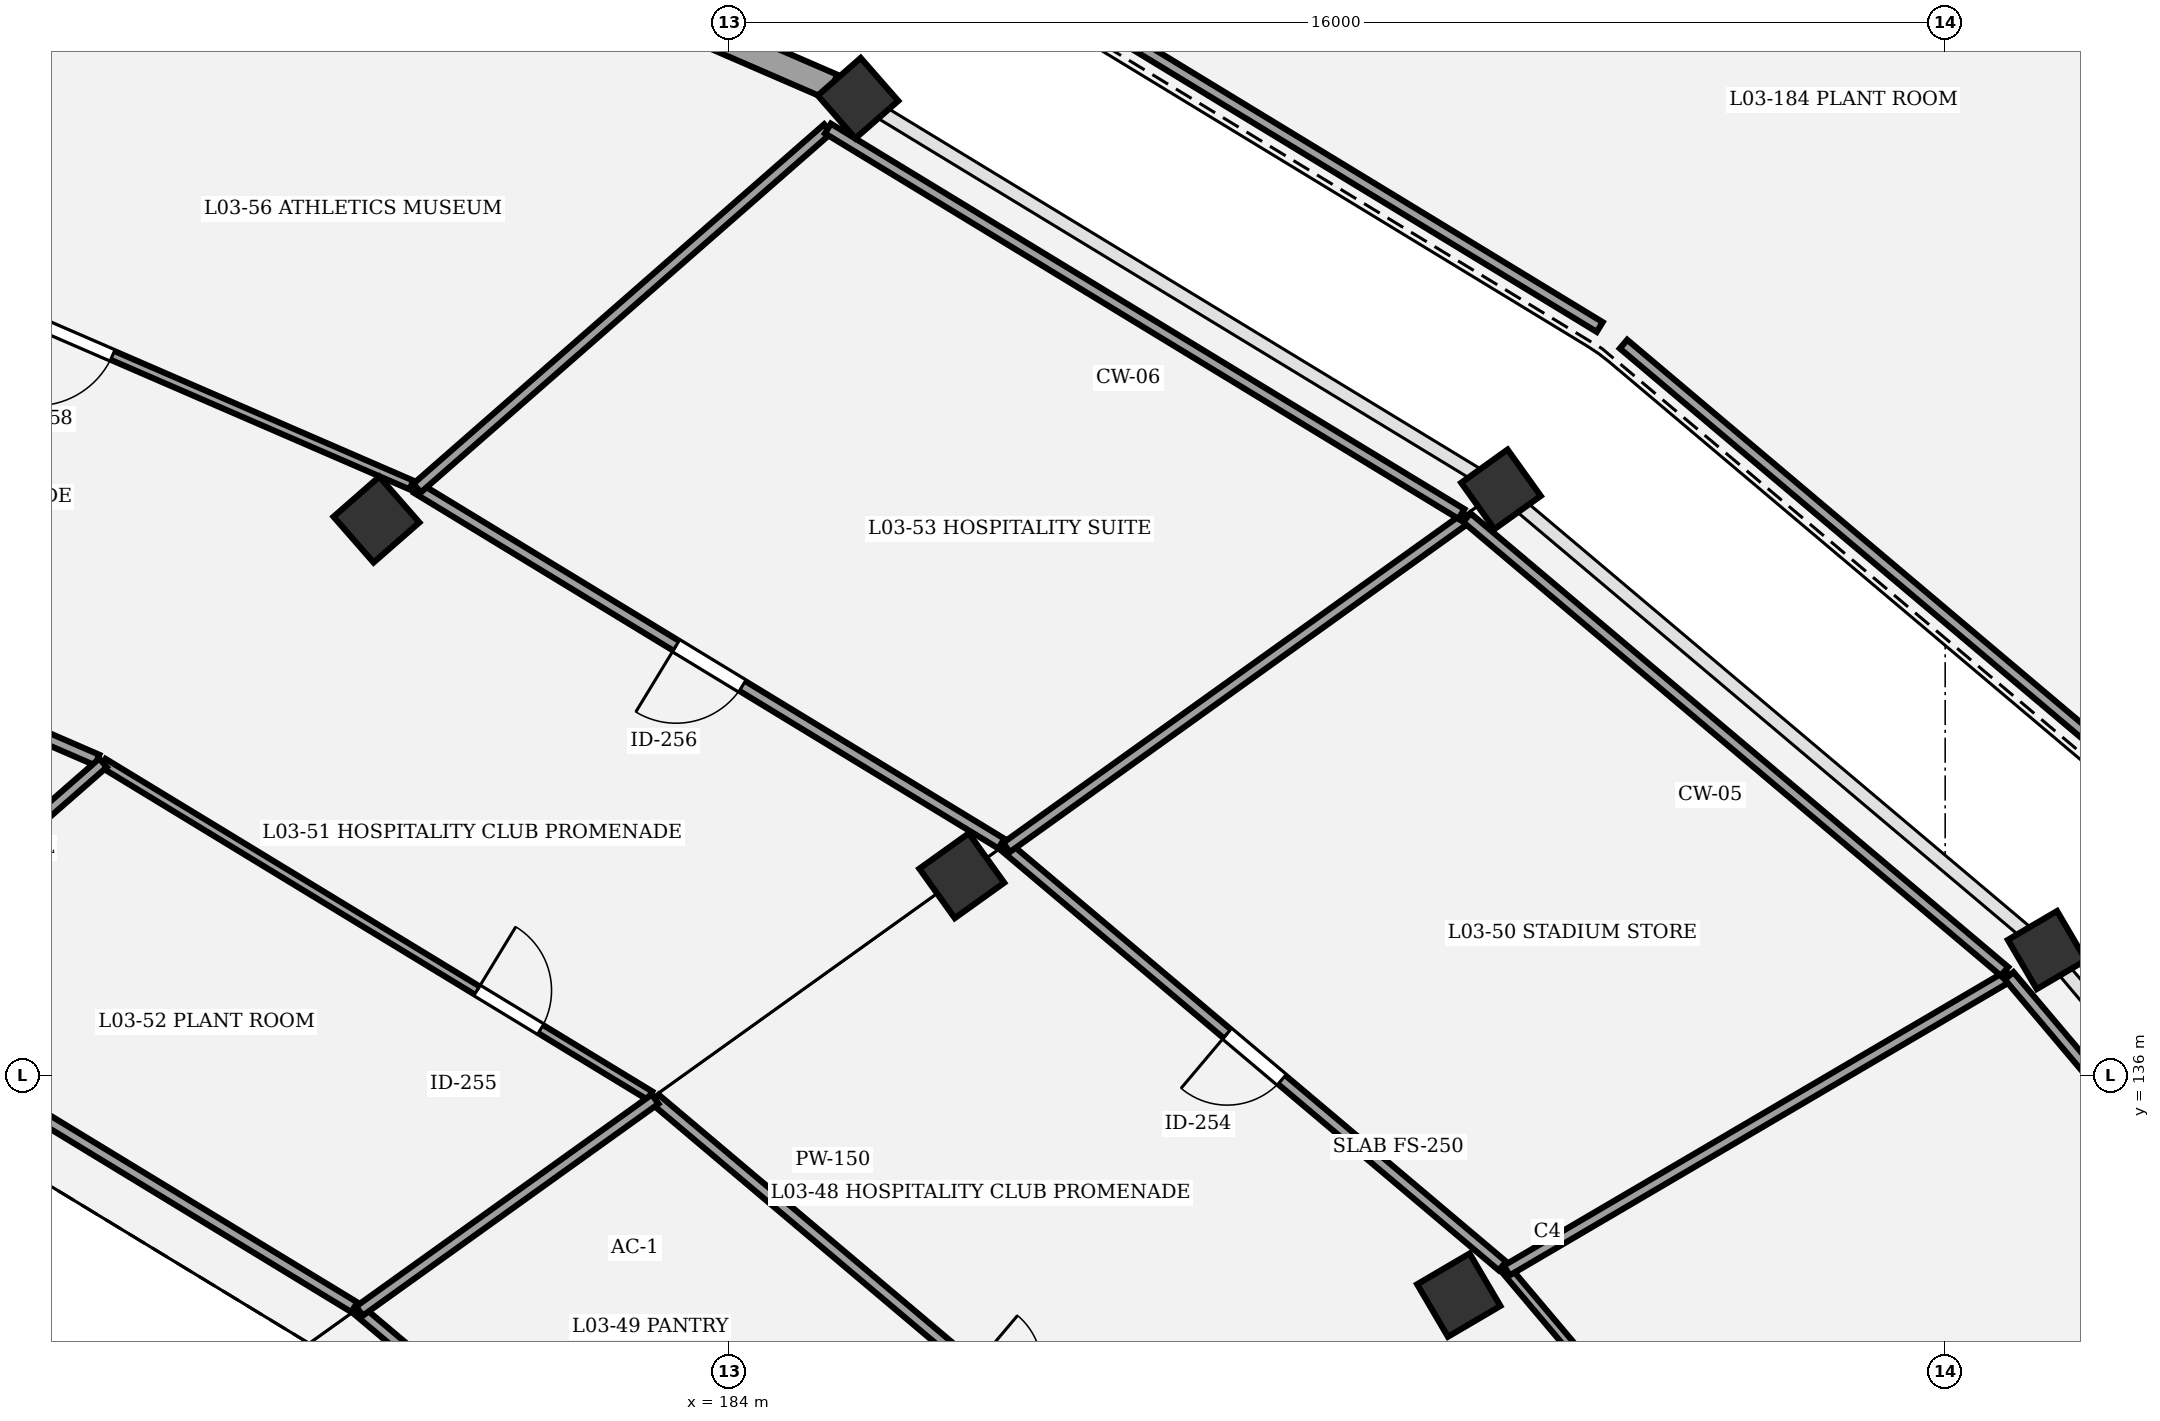
"""IFC4 building model, lengths in metres.
Left out: names, types, materials, properties, quantities, classifications, styles, units other than length and angle.
Written with IfcOpenShell. Run it as: python <this file> out.ifc"""

import sys

from ifc_helpers import new_model, si_unit, direction, frame, frame_2d, origin, origin_2d, place, context, subcontext, project, spatial, rectangle, extrude, element, fill, save


model = new_model("IFC4")
c1 = context("Model", 3, precision=1e-05, world=origin(), true_north=direction((0.0, 1.0)))
c2 = subcontext(c1, "Body", "Model", "MODEL_VIEW")
j1 = project(units=[si_unit("LENGTHUNIT", "METRE"), si_unit("PLANEANGLEUNIT", "RADIAN")], contexts=[c1])
p1 = place(None, origin())
s1 = spatial("IfcSite", under=j1, at=p1, CompositionType="ELEMENT")
p2 = place(p1, origin())
s2 = spatial("IfcBuilding", under=s1, at=p2, CompositionType="ELEMENT")
p3 = place(p2, frame((0.0, 0.0, 14.7)))
s3 = spatial("IfcBuildingStorey", under=s2, at=p3, CompositionType="ELEMENT", Elevation=14.7)
p4 = place(p3, frame((193.6, 133.114, 0.0), z_axis=(0.0, 0.0, 1.0), x_axis=(0.862513669207, 0.506033764121, 0.0)))
e1 = element("IfcColumn", 1, at=p4, inside=s3, PredefinedType="COLUMN", context=c2, shape_type="SweptSolid", body=[
    extrude(rectangle(XDim=0.8, YDim=0.8, at=origin_2d()), origin(), (0.0, 0.0, 1.0), 4.5),
])
p5 = place(p3, frame((201.338, 137.654, 0.0), z_axis=(0.0, 0.0, 1.0), x_axis=(0.862513669207, 0.506033764121, 0.0)))
e2 = element("IfcColumn", 2, at=p5, inside=s3, PredefinedType="COLUMN", context=c2, shape_type="SweptSolid", body=[
    extrude(rectangle(XDim=0.75, YDim=0.75, at=origin_2d()), origin(), (0.0, 0.0, 1.0), 4.5),
])
p6 = place(p3, frame((187.061, 138.632, 0.0), z_axis=(0.0, 0.0, 1.0), x_axis=(0.812897512265, 0.582406760395, 0.0)))
e3 = element("IfcColumn", 3, at=p6, inside=s3, PredefinedType="COLUMN", context=c2, shape_type="SweptSolid", body=[
    extrude(rectangle(XDim=0.8, YDim=0.8, at=origin_2d()), origin(), (0.0, 0.0, 1.0), 4.5),
])
p7 = place(p3, frame((194.156, 143.715, 0.0), z_axis=(0.0, 0.0, 1.0), x_axis=(0.812897512265, 0.582406760395, 0.0)))
e4 = element("IfcColumn", 4, at=p7, inside=s3, PredefinedType="COLUMN", context=c2, shape_type="SweptSolid", body=[
    extrude(rectangle(XDim=0.75, YDim=0.75, at=origin_2d()), origin(), (0.0, 0.0, 1.0), 4.5),
])
p8 = place(p3, frame((179.36, 143.317, 0.0), z_axis=(0.0, 0.0, 1.0), x_axis=(0.752529860433, 0.658558128912, 0.0)))
e5 = element("IfcColumn", 5, at=p8, inside=s3, PredefinedType="COLUMN", context=c2, shape_type="SweptSolid", body=[
    extrude(rectangle(XDim=0.8, YDim=0.8, at=origin_2d()), origin(), (0.0, 0.0, 1.0), 4.5),
])
p9 = place(p3, frame((185.696, 148.861, 0.0), z_axis=(0.0, 0.0, 1.0), x_axis=(0.752529860433, 0.658558128912, 0.0)))
e6 = element("IfcColumn", 6, at=p9, inside=s3, PredefinedType="COLUMN", context=c2, shape_type="SweptSolid", body=[
    extrude(rectangle(XDim=0.75, YDim=0.75, at=origin_2d()), origin(), (0.0, 0.0, 1.0), 4.5),
])
p10 = place(p3, frame((176.28, 152.943, 0.0), z_axis=(0.0, 0.0, 1.0), x_axis=(0.917502782842, -0.397729359587, 0.0)))
e7 = element("IfcWall", 7, at=p10, inside=s3, PredefinedType="STANDARD", context=c2, shape_type="SweptSolid", body=[
    extrude(rectangle(XDim=9.89, YDim=0.35, at=frame_2d((4.945, 0.0))), origin(), (0.0, 0.0, 1.0), 3.42),
])
p11 = place(p10, frame((4.045, 0.0, 0.0)))
e8 = element("IfcOpeningElement", 8, at=p11, cuts=e7, PredefinedType="OPENING", context=c2, shape_type="SweptSolid", body=[
    extrude(rectangle(XDim=1.8, YDim=2.4, at=frame_2d((0.9, 1.2))), frame((0.0, 0.185, 0.0), z_axis=(0.0, -1.0, 0.0), x_axis=(1.0, 0.0, 0.0)), (0.0, 0.0, 1.0), 0.37),
])
p12 = place(p3, frame((199.595, 127.086, 0.0), z_axis=(0.0, 0.0, 1.0), x_axis=(-0.64516519871, 0.76404310505, 0.0)))
e9 = element("IfcWall", 9, at=p12, inside=s3, PredefinedType="PARTITIONING", context=c2, shape_type="SweptSolid", body=[
    extrude(rectangle(XDim=8.313, YDim=0.125, at=frame_2d((4.157, 0.0))), origin(), (0.0, 0.0, 1.0), 3.25),
])
p13 = place(p12, frame((3.457, 0.0, 0.0)))
e10 = element("IfcOpeningElement", 10, at=p13, cuts=e9, PredefinedType="OPENING", context=c2, shape_type="SweptSolid", body=[
    extrude(rectangle(XDim=1.4, YDim=2.3, at=frame_2d((0.7, 1.15))), frame((0.0, 0.073, 0.0), z_axis=(0.0, -1.0, 0.0), x_axis=(1.0, 0.0, 0.0)), (0.0, 0.0, 1.0), 0.145),
])
p14 = place(p3, frame((183.027, 135.692, 0.0), z_axis=(0.0, 0.0, 1.0), x_axis=(0.764249122867, -0.644921141068, 0.0)))
e11 = element("IfcWall", 11, at=p14, inside=s3, PredefinedType="PARTITIONING", context=c2, shape_type="SweptSolid", body=[
    extrude(rectangle(XDim=7.99, YDim=0.15, at=frame_2d((3.995, 0.0))), origin(), (0.0, 0.0, 1.0), 3.25),
])
p15 = place(p14, frame((5.479, 0.0, 0.0)))
e12 = element("IfcOpeningElement", 12, at=p15, cuts=e11, PredefinedType="OPENING", context=c2, shape_type="SweptSolid", body=[
    extrude(rectangle(XDim=0.9, YDim=2.1, at=frame_2d((0.45, 1.05))), frame((0.0, 0.085, 0.0), z_axis=(0.0, -1.0, 0.0), x_axis=(1.0, 0.0, 0.0)), (0.0, 0.0, 1.0), 0.17),
])
p16 = place(p3, frame((194.175, 133.497, 0.0), z_axis=(0.0, 0.0, 1.0), x_axis=(-0.764257572309, 0.644911128117, 0.0)))
e13 = element("IfcWall", 13, at=p16, inside=s3, PredefinedType="PARTITIONING", context=c2, shape_type="SweptSolid", body=[
    extrude(rectangle(XDim=8.539, YDim=0.15, at=frame_2d((4.269, 0.0))), origin(), (0.0, 0.0, 1.0), 3.25),
])
p17 = place(p16, frame((3.799, 0.0, 0.0)))
e14 = element("IfcOpeningElement", 14, at=p17, cuts=e13, PredefinedType="OPENING", context=c2, shape_type="SweptSolid", body=[
    extrude(rectangle(XDim=0.94, YDim=2.1, at=frame_2d((0.47, 1.05))), frame((0.0, 0.085, 0.0), z_axis=(0.0, -1.0, 0.0), x_axis=(1.0, 0.0, 0.0)), (0.0, 0.0, 1.0), 0.17),
])
p18 = place(p3, frame((175.763, 140.116, 0.0), z_axis=(0.0, 0.0, 1.0), x_axis=(0.854330104408, -0.519730769439, 0.0)))
e15 = element("IfcWall", 15, at=p18, inside=s3, PredefinedType="PARTITIONING", context=c2, shape_type="SweptSolid", body=[
    extrude(rectangle(XDim=8.42, YDim=0.125, at=frame_2d((4.21, 0.0))), origin(), (0.0, 0.0, 1.0), 3.25),
])
p19 = place(p18, frame((5.76, 0.0, 0.0)))
e16 = element("IfcOpeningElement", 16, at=p19, cuts=e15, PredefinedType="OPENING", context=c2, shape_type="SweptSolid", body=[
    extrude(rectangle(XDim=0.98, YDim=2.1, at=frame_2d((0.49, 1.05))), frame((0.0, 0.073, 0.0), z_axis=(0.0, -1.0, 0.0), x_axis=(1.0, 0.0, 0.0)), (0.0, 0.0, 1.0), 0.145),
])
p20 = place(p3, frame((187.582, 139.054, 0.0), z_axis=(0.0, 0.0, 1.0), x_axis=(-0.854321649351, 0.519744667554, 0.0)))
e17 = element("IfcWall", 17, at=p20, inside=s3, PredefinedType="PARTITIONING", context=c2, shape_type="SweptSolid", body=[
    extrude(rectangle(XDim=8.999, YDim=0.15, at=frame_2d((4.499, 0.0))), origin(), (0.0, 0.0, 1.0), 3.25),
])
p21 = place(p20, frame((3.989, 0.0, 0.0)))
e18 = element("IfcOpeningElement", 18, at=p21, cuts=e17, PredefinedType="OPENING", context=c2, shape_type="SweptSolid", body=[
    extrude(rectangle(XDim=1.02, YDim=2.1, at=frame_2d((0.51, 1.05))), frame((0.0, 0.085, 0.0), z_axis=(0.0, -1.0, 0.0), x_axis=(1.0, 0.0, 0.0)), (0.0, 0.0, 1.0), 0.17),
])
p22 = place(p3, frame((167.382, 143.753, 0.0), z_axis=(0.0, 0.0, 1.0), x_axis=(0.917494590455, -0.397748257677, 0.0)))
e19 = element("IfcWall", 19, at=p22, inside=s3, PredefinedType="PARTITIONING", context=c2, shape_type="SweptSolid", body=[
    extrude(rectangle(XDim=9.049, YDim=0.15, at=frame_2d((4.525, 0.0))), origin(), (0.0, 0.0, 1.0), 3.25),
])
p23 = place(p22, frame((6.199, 0.0, 0.0)))
e20 = element("IfcOpeningElement", 20, at=p23, cuts=e19, PredefinedType="OPENING", context=c2, shape_type="SweptSolid", body=[
    extrude(rectangle(XDim=1.06, YDim=2.1, at=frame_2d((0.53, 1.05))), frame((0.0, 0.085, 0.0), z_axis=(0.0, -1.0, 0.0), x_axis=(1.0, 0.0, 0.0)), (0.0, 0.0, 1.0), 0.17),
])
p24 = place(p3, frame((179.82, 143.772, 0.0), z_axis=(0.0, 0.0, 1.0), x_axis=(-0.917508957037, 0.39771511633, 0.0)))
e21 = element("IfcWall", 21, at=p24, inside=s3, PredefinedType="PARTITIONING", context=c2, shape_type="SweptSolid", body=[
    extrude(rectangle(XDim=9.671, YDim=0.125, at=frame_2d((4.836, 0.0))), origin(), (0.0, 0.0, 1.0), 3.25),
])
p25 = place(p24, frame((4.286, 0.0, 0.0)))
e22 = element("IfcOpeningElement", 22, at=p25, cuts=e21, PredefinedType="OPENING", context=c2, shape_type="SweptSolid", body=[
    extrude(rectangle(XDim=1.1, YDim=2.1, at=frame_2d((0.55, 1.05))), frame((0.0, 0.073, 0.0), z_axis=(0.0, -1.0, 0.0), x_axis=(1.0, 0.0, 0.0)), (0.0, 0.0, 1.0), 0.145),
])
p26 = place(p3, frame((194.232, 133.438, 0.0), z_axis=(0.0, 0.0, 1.0), x_axis=(0.862520085009, 0.506022828492, 0.0)))
e23 = element("IfcWall", 23, at=p26, inside=s3, PredefinedType="PARTITIONING", context=c2, shape_type="SweptSolid", body=[
    extrude(rectangle(XDim=7.663, YDim=0.15, at=frame_2d((3.831, 0.0))), origin(), (0.0, 0.0, 1.0), 3.25),
])
p27 = place(p3, frame((200.841, 137.315, 0.0), z_axis=(0.0, 0.0, 1.0), x_axis=(0.645166061073, -0.764042376861, 0.0)))
e24 = element("IfcWall", 24, at=p27, inside=s3, PredefinedType="PARTITIONING", context=c2, shape_type="SweptSolid", body=[
    extrude(rectangle(XDim=9.014, YDim=0.15, at=frame_2d((4.507, 0.0))), origin(), (0.0, 0.0, 1.0), 3.25),
])
p28 = place(p3, frame((184.889, 128.049, 0.0), z_axis=(0.0, 0.0, 1.0), x_axis=(-0.764259013583, 0.644909420118, 0.0)))
e25 = element("IfcWall", 25, at=p28, inside=s3, PredefinedType="PARTITIONING", context=c2, shape_type="SweptSolid", body=[
    extrude(rectangle(XDim=7.528, YDim=0.15, at=frame_2d((3.764, 0.0))), origin(), (0.0, 0.0, 1.0), 3.25),
])
p29 = place(p3, frame((179.136, 132.904, 0.0), z_axis=(0.0, 0.0, 1.0), x_axis=(0.812877901281, 0.582434131563, 0.0)))
e26 = element("IfcWall", 26, at=p29, inside=s3, PredefinedType="PARTITIONING", context=c2, shape_type="SweptSolid", body=[
    extrude(rectangle(XDim=4.787, YDim=0.15, at=frame_2d((2.393, 0.0))), origin(), (0.0, 0.0, 1.0), 3.25),
])
p30 = place(p3, frame((187.649, 139.004, 0.0), z_axis=(0.0, 0.0, 1.0), x_axis=(0.812884613266, 0.582424763824, 0.0)))
e27 = element("IfcWall", 27, at=p30, inside=s3, PredefinedType="PARTITIONING", context=c2, shape_type="SweptSolid", body=[
    extrude(rectangle(XDim=7.45, YDim=0.15, at=frame_2d((3.725, 0.0))), origin(), (0.0, 0.0, 1.0), 3.25),
])
p31 = place(p3, frame((193.706, 143.343, 0.0), z_axis=(0.0, 0.0, 1.0), x_axis=(0.764252893528, -0.644916672706, 0.0)))
e28 = element("IfcWall", 28, at=p31, inside=s3, PredefinedType="PARTITIONING", context=c2, shape_type="SweptSolid", body=[
    extrude(rectangle(XDim=9.257, YDim=0.15, at=frame_2d((4.629, 0.0))), origin(), (0.0, 0.0, 1.0), 3.25),
])
p32 = place(p3, frame((179.069, 132.955, 0.0), z_axis=(0.0, 0.0, 1.0), x_axis=(-0.854324504961, 0.519739973663, 0.0)))
e29 = element("IfcWall", 29, at=p32, inside=s3, PredefinedType="PARTITIONING", context=c2, shape_type="SweptSolid", body=[
    extrude(rectangle(XDim=7.934, YDim=0.15, at=frame_2d((3.967, 0.0))), origin(), (0.0, 0.0, 1.0), 3.25),
])
p33 = place(p3, frame((172.291, 137.078, 0.0), z_axis=(0.0, 0.0, 1.0), x_axis=(0.75256358092, 0.658519594753, 0.0)))
e30 = element("IfcWall", 30, at=p33, inside=s3, PredefinedType="PARTITIONING", context=c2, shape_type="SweptSolid", body=[
    extrude(rectangle(XDim=4.613, YDim=0.15, at=frame_2d((2.307, 0.0))), origin(), (0.0, 0.0, 1.0), 3.25),
])
p34 = place(p3, frame((179.895, 143.731, 0.0), z_axis=(0.0, 0.0, 1.0), x_axis=(0.752564061831, 0.658519045162, 0.0)))
e31 = element("IfcWall", 31, at=p34, inside=s3, PredefinedType="PARTITIONING", context=c2, shape_type="SweptSolid", body=[
    extrude(rectangle(XDim=7.183, YDim=0.15, at=frame_2d((3.592, 0.0))), origin(), (0.0, 0.0, 1.0), 3.25),
])
p35 = place(p3, frame((185.3, 148.461, 0.0), z_axis=(0.0, 0.0, 1.0), x_axis=(0.854323689683, -0.519741313777, 0.0)))
e32 = element("IfcWall", 32, at=p35, inside=s3, PredefinedType="PARTITIONING", context=c2, shape_type="SweptSolid", body=[
    extrude(rectangle(XDim=9.756, YDim=0.15, at=frame_2d((4.878, 0.0))), origin(), (0.0, 0.0, 1.0), 3.25),
])
p36 = place(p3, frame((172.286, 149.072, 0.0), z_axis=(0.0, 0.0, 1.0), x_axis=(0.67785928919, 0.735191664846, 0.0)))
e33 = element("IfcWall", 33, at=p36, inside=s3, PredefinedType="PARTITIONING", context=c2, shape_type="SweptSolid", body=[
    extrude(rectangle(XDim=4.893, YDim=0.15, at=frame_2d((2.446, 0.0))), origin(), (0.0, 0.0, 1.0), 3.25),
])
p37 = place(p3, frame((195.455, 145.85, 0.0), z_axis=(0.0, 0.0, 1.0), x_axis=(-0.854333268174, 0.519725568826, 0.0)))
e34 = element("IfcWall", 34, at=p37, inside=s3, PredefinedType="PARTITIONING", context=c2, shape_type="SweptSolid", body=[
    extrude(rectangle(XDim=9.902, YDim=0.15, at=frame_2d((4.951, 0.0))), origin(), (0.0, 0.0, 1.0), 3.25),
])
p38 = place(p3, frame((202.9, 139.607, 0.0), z_axis=(0.0, 0.0, 1.0), x_axis=(-0.764245949545, 0.644924901523, 0.0)))
e35 = element("IfcWall", 35, at=p38, inside=s3, PredefinedType="PARTITIONING", context=c2, shape_type="SweptSolid", body=[
    extrude(rectangle(XDim=9.332, YDim=0.15, at=frame_2d((4.666, 0.0))), origin(), (0.0, 0.0, 1.0), 3.25),
])
p39 = place(p17, origin())
e36 = element("IfcDoor", 36, at=p39, inside=s3, OperationType="SINGLE_SWING_RIGHT", PredefinedType="DOOR", context=c2, shape_type="SweptSolid", body=[
    extrude(rectangle(XDim=0.94, YDim=2.1, at=frame_2d((0.47, 1.05))), frame((0.0, 0.025, 0.0), z_axis=(0.0, -1.0, 0.0), x_axis=(1.0, 0.0, 0.0)), (0.0, 0.0, 1.0), 0.05),
])
fill(e14, e36)
p40 = place(p19, origin())
e37 = element("IfcDoor", 37, at=p40, inside=s3, OperationType="SINGLE_SWING_LEFT", PredefinedType="DOOR", context=c2, shape_type="SweptSolid", body=[
    extrude(rectangle(XDim=0.98, YDim=2.1, at=frame_2d((0.49, 1.05))), frame((0.0, 0.025, 0.0), z_axis=(0.0, -1.0, 0.0), x_axis=(1.0, 0.0, 0.0)), (0.0, 0.0, 1.0), 0.05),
])
fill(e16, e37)
p41 = place(p21, origin())
e38 = element("IfcDoor", 38, at=p41, inside=s3, OperationType="SINGLE_SWING_RIGHT", PredefinedType="DOOR", context=c2, shape_type="SweptSolid", body=[
    extrude(rectangle(XDim=1.02, YDim=2.1, at=frame_2d((0.51, 1.05))), frame((0.0, 0.025, 0.0), z_axis=(0.0, -1.0, 0.0), x_axis=(1.0, 0.0, 0.0)), (0.0, 0.0, 1.0), 0.05),
])
fill(e18, e38)
p42 = place(p25, origin())
e39 = element("IfcDoor", 39, at=p42, inside=s3, OperationType="SINGLE_SWING_RIGHT", PredefinedType="DOOR", context=c2, shape_type="SweptSolid", body=[
    extrude(rectangle(XDim=1.1, YDim=2.1, at=frame_2d((0.55, 1.05))), frame((0.0, 0.025, 0.0), z_axis=(0.0, -1.0, 0.0), x_axis=(1.0, 0.0, 0.0)), (0.0, 0.0, 1.0), 0.05),
])
fill(e22, e39)
save(model, sys.argv[1])
